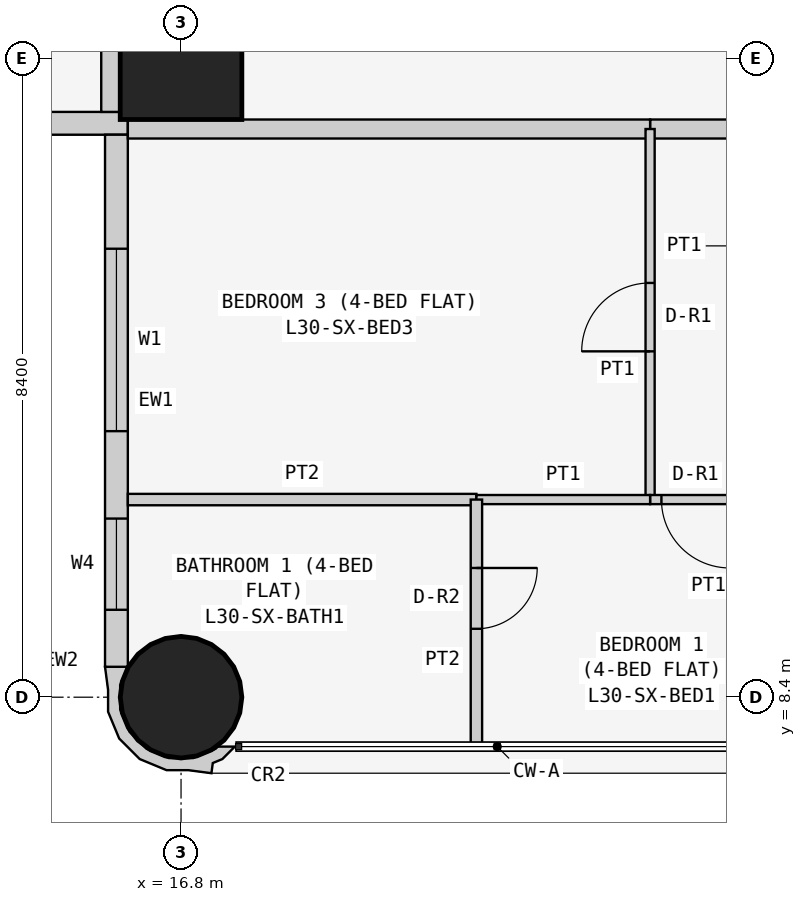
"""IFC4 building model, lengths in metres.
Left out: names, types, materials, properties, quantities, classifications, styles, units other than length and angle.
Written with IfcOpenShell. Run it as: python <this file> out.ifc"""

import sys

from ifc_helpers import new_model, si_unit, direction, frame, frame_2d, origin, origin_2d, place, context, subcontext, project, spatial, polyline, rectangle, circle, outline, extrude, element, fill, save


model = new_model("IFC4")
c1 = context("Model", 3, precision=1e-05, world=origin(), true_north=direction((0.0, 1.0)))
c2 = subcontext(c1, "Body", "Model", "MODEL_VIEW")
j1 = project(units=[si_unit("LENGTHUNIT", "METRE"), si_unit("PLANEANGLEUNIT", "RADIAN")], contexts=[c1])
p1 = place(None, origin())
s1 = spatial("IfcSite", under=j1, at=p1, CompositionType="ELEMENT")
p2 = place(p1, origin())
s2 = spatial("IfcBuilding", under=s1, at=p2, CompositionType="ELEMENT")
p3 = place(p2, frame((0.0, 0.0, 119.7)))
s3 = spatial("IfcBuildingStorey", under=s2, at=p3, CompositionType="ELEMENT", Elevation=119.7)
p4 = place(p3, frame((16.8, 8.4, 0.0), z_axis=(0.0, 0.0, 1.0), x_axis=(1.0, 0.0, 0.0)))
e1 = element("IfcColumn", 1, at=p4, inside=s3, PredefinedType="COLUMN", context=c2, shape_type="SweptSolid", body=[
    extrude(circle(Radius=0.8, at=origin_2d()), origin(), (0.0, 0.0, 1.0), 3.6),
])
p5 = place(p3, frame((16.8, 16.8, 0.0), z_axis=(0.0, 0.0, 1.0), x_axis=(1.0, 0.0, 0.0)))
e2 = element("IfcColumn", 2, at=p5, inside=s3, PredefinedType="COLUMN", context=c2, shape_type="SweptSolid", body=[
    extrude(rectangle(XDim=1.6, YDim=1.6, at=origin_2d()), origin(), (0.0, 0.0, 1.0), 3.6),
])
p6 = place(p3, frame((0.4, 15.95, 0.0), z_axis=(0.0, 0.0, 1.0), x_axis=(1.0, 0.0, 0.0)))
e3 = element("IfcWall", 3, at=p6, inside=s3, PredefinedType="SOLIDWALL", context=c2, shape_type="SweptSolid", body=[
    extrude(rectangle(XDim=15.7, YDim=0.3, at=frame_2d((7.85, 0.0))), origin(), (0.0, 0.0, 1.0), 3.45),
])
p7 = place(p6, frame((12.4, 0.0, 0.9)))
e4 = element("IfcOpeningElement", 4, at=p7, cuts=e3, PredefinedType="OPENING", context=c2, shape_type="SweptSolid", body=[
    extrude(rectangle(XDim=1.8, YDim=1.5, at=frame_2d((0.9, 0.75))), frame((0.0, 0.16, 0.0), z_axis=(0.0, -1.0, 0.0), x_axis=(1.0, 0.0, 0.0)), (0.0, 0.0, 1.0), 0.32),
])
p8 = place(p6, frame((9.55, 0.0, 1.5)))
e5 = element("IfcOpeningElement", 5, at=p8, cuts=e3, PredefinedType="OPENING", context=c2, shape_type="SweptSolid", body=[
    extrude(rectangle(XDim=0.9, YDim=0.7, at=frame_2d((0.45, 0.35))), frame((0.0, 0.16, 0.0), z_axis=(0.0, -1.0, 0.0), x_axis=(1.0, 0.0, 0.0)), (0.0, 0.0, 1.0), 0.32),
])
p9 = place(p6, frame((5.1, 0.0, 0.9)))
e6 = element("IfcOpeningElement", 6, at=p9, cuts=e3, PredefinedType="OPENING", context=c2, shape_type="SweptSolid", body=[
    extrude(rectangle(XDim=1.8, YDim=1.5, at=frame_2d((0.9, 0.75))), frame((0.0, 0.16, 0.0), z_axis=(0.0, -1.0, 0.0), x_axis=(1.0, 0.0, 0.0)), (0.0, 0.0, 1.0), 0.32),
])
p10 = place(p6, frame((2.0, 0.0, 0.0)))
e7 = element("IfcOpeningElement", 7, at=p10, cuts=e3, PredefinedType="OPENING", context=c2, shape_type="SweptSolid", body=[
    extrude(rectangle(XDim=0.9, YDim=2.4, at=frame_2d((0.45, 1.2))), frame((0.0, 0.16, 0.0), z_axis=(0.0, -1.0, 0.0), x_axis=(1.0, 0.0, 0.0)), (0.0, 0.0, 1.0), 0.32),
])
p11 = place(p6, frame((0.7, 0.0, 0.9)))
e8 = element("IfcOpeningElement", 8, at=p11, cuts=e3, PredefinedType="OPENING", context=c2, shape_type="SweptSolid", body=[
    extrude(rectangle(XDim=1.2, YDim=1.5, at=frame_2d((0.6, 0.75))), frame((0.0, 0.16, 0.0), z_axis=(0.0, -1.0, 0.0), x_axis=(1.0, 0.0, 0.0)), (0.0, 0.0, 1.0), 0.32),
])
p12 = place(p3, frame((15.95, 15.8, 0.0), z_axis=(0.0, 0.0, 1.0), x_axis=(0.0, -1.0, 0.0)))
e9 = element("IfcWall", 9, at=p12, inside=s3, PredefinedType="SOLIDWALL", context=c2, shape_type="SweptSolid", body=[
    extrude(rectangle(XDim=7.0, YDim=0.3, at=frame_2d((3.5, 0.0))), origin(), (0.0, 0.0, 1.0), 3.45),
])
p13 = place(p12, frame((1.5, 0.0, 0.9)))
e10 = element("IfcOpeningElement", 10, at=p13, cuts=e9, PredefinedType="OPENING", context=c2, shape_type="SweptSolid", body=[
    extrude(rectangle(XDim=2.4, YDim=1.5, at=frame_2d((1.2, 0.75))), frame((0.0, 0.16, 0.0), z_axis=(0.0, -1.0, 0.0), x_axis=(1.0, 0.0, 0.0)), (0.0, 0.0, 1.0), 0.32),
])
p14 = place(p12, frame((5.05, 0.0, 0.9)))
e11 = element("IfcOpeningElement", 11, at=p14, cuts=e9, PredefinedType="OPENING", context=c2, shape_type="SweptSolid", body=[
    extrude(rectangle(XDim=1.2, YDim=1.5, at=frame_2d((0.6, 0.75))), frame((0.0, 0.16, 0.0), z_axis=(0.0, -1.0, 0.0), x_axis=(1.0, 0.0, 0.0)), (0.0, 0.0, 1.0), 0.32),
])
p15 = place(p3, frame((15.983, 8.727, 0.0), z_axis=(0.0, 0.0, 1.0), x_axis=(-0.343276641956, -0.93923434088, 0.0)))
e12 = element("IfcWall", 12, at=p15, inside=s3, PredefinedType="SOLIDWALL", context=c2, shape_type="SweptSolid", body=[
    extrude(outline(polyline([(0.829, 1.599), (0.697, 1.569), (0.604, 1.67), (0.394, 1.767), (0.471, 1.556), (0.509, 1.539), (0.724, 1.304), (0.833, 1.005), (0.82, 0.686), (0.686, 0.397), (0.451, 0.182), (0.152, 0.073), (-0.116, 0.084), (-0.127, 0.078), (-0.146, 0.071), (-0.006, -0.197), (0.266, -0.055), (0.535, 0.044), (0.817, 0.302), (0.978, 0.648), (0.994, 1.03), (0.895, 1.3), (0.829, 1.599)])), origin(), (0.0, 0.0, 1.0), 3.45),
])
p16 = place(p3, frame((24.171, 15.875, 0.0), z_axis=(0.0, 0.0, 1.0), x_axis=(-1.0, 0.0, 0.0)))
e13 = element("IfcWall", 13, at=p16, inside=s3, PredefinedType="PARTITIONING", context=c2, shape_type="SweptSolid", body=[
    extrude(rectangle(XDim=1.2, YDim=0.25, at=frame_2d((0.6, 0.0))), origin(), (0.0, 0.0, 1.0), 3.45),
])
for number, where, z_axis, x_axis in (
    (14, (22.971, 15.875, 0.0), (0.0, 0.0, 1.0), (-1.0, 0.0, 0.0)),
    (15, (15.875, 16.1, 0.0), (0.0, 0.0, 1.0), (0.0, 1.0, 0.0)),
):
    element("IfcWall", number, at=place(p3, frame(where, z_axis=z_axis, x_axis=x_axis)), inside=s3, PredefinedType="PARTITIONING", context=c2, shape_type="SweptSolid", body=[
        extrude(rectangle(XDim=6.871, YDim=0.25, at=frame_2d((3.436, 0.0))), origin(), (0.0, 0.0, 1.0), 3.45),
    ])
p17 = place(p3, frame((22.971, 11.0, 0.0), z_axis=(0.0, 0.0, 1.0), x_axis=(0.0, 1.0, 0.0)))
e16 = element("IfcWall", 16, at=p17, inside=s3, PredefinedType="PARTITIONING", context=c2, shape_type="SweptSolid", body=[
    extrude(rectangle(XDim=4.875, YDim=0.12, at=frame_2d((2.438, 0.0))), origin(), (0.0, 0.0, 1.0), 3.45),
])
p18 = place(p17, frame((1.95, 0.0, 0.0)))
e17 = element("IfcOpeningElement", 17, at=p18, cuts=e16, PredefinedType="OPENING", context=c2, shape_type="SweptSolid", body=[
    extrude(rectangle(XDim=0.9, YDim=2.1, at=frame_2d((0.45, 1.05))), frame((0.0, 0.07, 0.0), z_axis=(0.0, -1.0, 0.0), x_axis=(1.0, 0.0, 0.0)), (0.0, 0.0, 1.0), 0.14),
])
p19 = place(p3, frame((24.171, 11.0, 0.0), z_axis=(0.0, 0.0, 1.0), x_axis=(-1.0, 0.0, 0.0)))
e18 = element("IfcWall", 18, at=p19, inside=s3, PredefinedType="PARTITIONING", context=c2, shape_type="SweptSolid", body=[
    extrude(rectangle(XDim=1.2, YDim=0.12, at=frame_2d((0.6, 0.0))), origin(), (0.0, 0.0, 1.0), 3.45),
])
p20 = place(p19, frame((0.151, 0.0, 0.0)))
e19 = element("IfcOpeningElement", 19, at=p20, cuts=e18, PredefinedType="OPENING", context=c2, shape_type="SweptSolid", body=[
    extrude(rectangle(XDim=0.9, YDim=2.1, at=frame_2d((0.45, 1.05))), frame((0.0, 0.07, 0.0), z_axis=(0.0, -1.0, 0.0), x_axis=(1.0, 0.0, 0.0)), (0.0, 0.0, 1.0), 0.14),
])
p21 = place(p3, frame((16.1, 11.0, 0.0), z_axis=(0.0, 0.0, 1.0), x_axis=(1.0, 0.0, 0.0)))
e20 = element("IfcWall", 20, at=p21, inside=s3, PredefinedType="PARTITIONING", context=c2, shape_type="SweptSolid", body=[
    extrude(rectangle(XDim=4.586, YDim=0.15, at=frame_2d((2.293, 0.0))), origin(), (0.0, 0.0, 1.0), 3.45),
])
p22 = place(p3, frame((20.686, 11.0, 0.0), z_axis=(0.0, 0.0, 1.0), x_axis=(1.0, 0.0, 0.0)))
e21 = element("IfcWall", 21, at=p22, inside=s3, PredefinedType="PARTITIONING", context=c2, shape_type="SweptSolid", body=[
    extrude(rectangle(XDim=2.285, YDim=0.12, at=frame_2d((1.143, 0.0))), origin(), (0.0, 0.0, 1.0), 3.45),
])
p23 = place(p3, frame((20.686, 7.75, 0.0), z_axis=(0.0, 0.0, 1.0), x_axis=(0.0, 1.0, 0.0)))
e22 = element("IfcWall", 22, at=p23, inside=s3, PredefinedType="PARTITIONING", context=c2, shape_type="SweptSolid", body=[
    extrude(rectangle(XDim=3.25, YDim=0.15, at=frame_2d((1.625, 0.0))), origin(), (0.0, 0.0, 1.0), 3.45),
])
p24 = place(p23, frame((1.55, 0.0, 0.0)))
e23 = element("IfcOpeningElement", 23, at=p24, cuts=e22, PredefinedType="OPENING", context=c2, shape_type="SweptSolid", body=[
    extrude(rectangle(XDim=0.8, YDim=2.1, at=frame_2d((0.4, 1.05))), frame((0.0, 0.085, 0.0), z_axis=(0.0, -1.0, 0.0), x_axis=(1.0, 0.0, 0.0)), (0.0, 0.0, 1.0), 0.17),
])
p25 = place(p13, origin())
e24 = element("IfcWindow", 24, at=p25, inside=s3, PartitioningType="SINGLE_PANEL", PredefinedType="WINDOW", context=c2, shape_type="SweptSolid", body=[
    extrude(rectangle(XDim=2.4, YDim=1.5, at=frame_2d((1.2, 0.75))), frame((0.0, 0.03, 0.0), z_axis=(0.0, -1.0, 0.0), x_axis=(1.0, 0.0, 0.0)), (0.0, 0.0, 1.0), 0.06),
])
fill(e10, e24)
p26 = place(p14, origin())
e25 = element("IfcWindow", 25, at=p26, inside=s3, PartitioningType="SINGLE_PANEL", PredefinedType="WINDOW", context=c2, shape_type="SweptSolid", body=[
    extrude(rectangle(XDim=1.2, YDim=1.5, at=frame_2d((0.6, 0.75))), frame((0.0, 0.03, 0.0), z_axis=(0.0, -1.0, 0.0), x_axis=(1.0, 0.0, 0.0)), (0.0, 0.0, 1.0), 0.06),
])
fill(e11, e25)
p27 = place(p18, origin())
e26 = element("IfcDoor", 26, at=p27, inside=s3, OperationType="SINGLE_SWING_LEFT", PredefinedType="DOOR", context=c2, shape_type="SweptSolid", body=[
    extrude(rectangle(XDim=0.9, YDim=2.1, at=frame_2d((0.45, 1.05))), frame((0.0, 0.025, 0.0), z_axis=(0.0, -1.0, 0.0), x_axis=(1.0, 0.0, 0.0)), (0.0, 0.0, 1.0), 0.05),
])
fill(e17, e26)
p28 = place(p20, origin())
e27 = element("IfcDoor", 27, at=p28, inside=s3, OperationType="SINGLE_SWING_LEFT", PredefinedType="DOOR", context=c2, shape_type="SweptSolid", body=[
    extrude(rectangle(XDim=0.9, YDim=2.1, at=frame_2d((0.45, 1.05))), frame((0.0, 0.025, 0.0), z_axis=(0.0, -1.0, 0.0), x_axis=(1.0, 0.0, 0.0)), (0.0, 0.0, 1.0), 0.05),
])
fill(e19, e27)
p29 = place(p24, frame((0.8, 0.0, 0.0), z_axis=(0.0, 0.0, 1.0), x_axis=(-1.0, 0.0, 0.0)))
e28 = element("IfcDoor", 28, at=p29, inside=s3, OperationType="SINGLE_SWING_LEFT", PredefinedType="DOOR", context=c2, shape_type="SweptSolid", body=[
    extrude(rectangle(XDim=0.8, YDim=2.1, at=frame_2d((0.4, 1.05))), frame((0.0, 0.025, 0.0), z_axis=(0.0, -1.0, 0.0), x_axis=(1.0, 0.0, 0.0)), (0.0, 0.0, 1.0), 0.05),
])
fill(e23, e28)
save(model, sys.argv[1])
